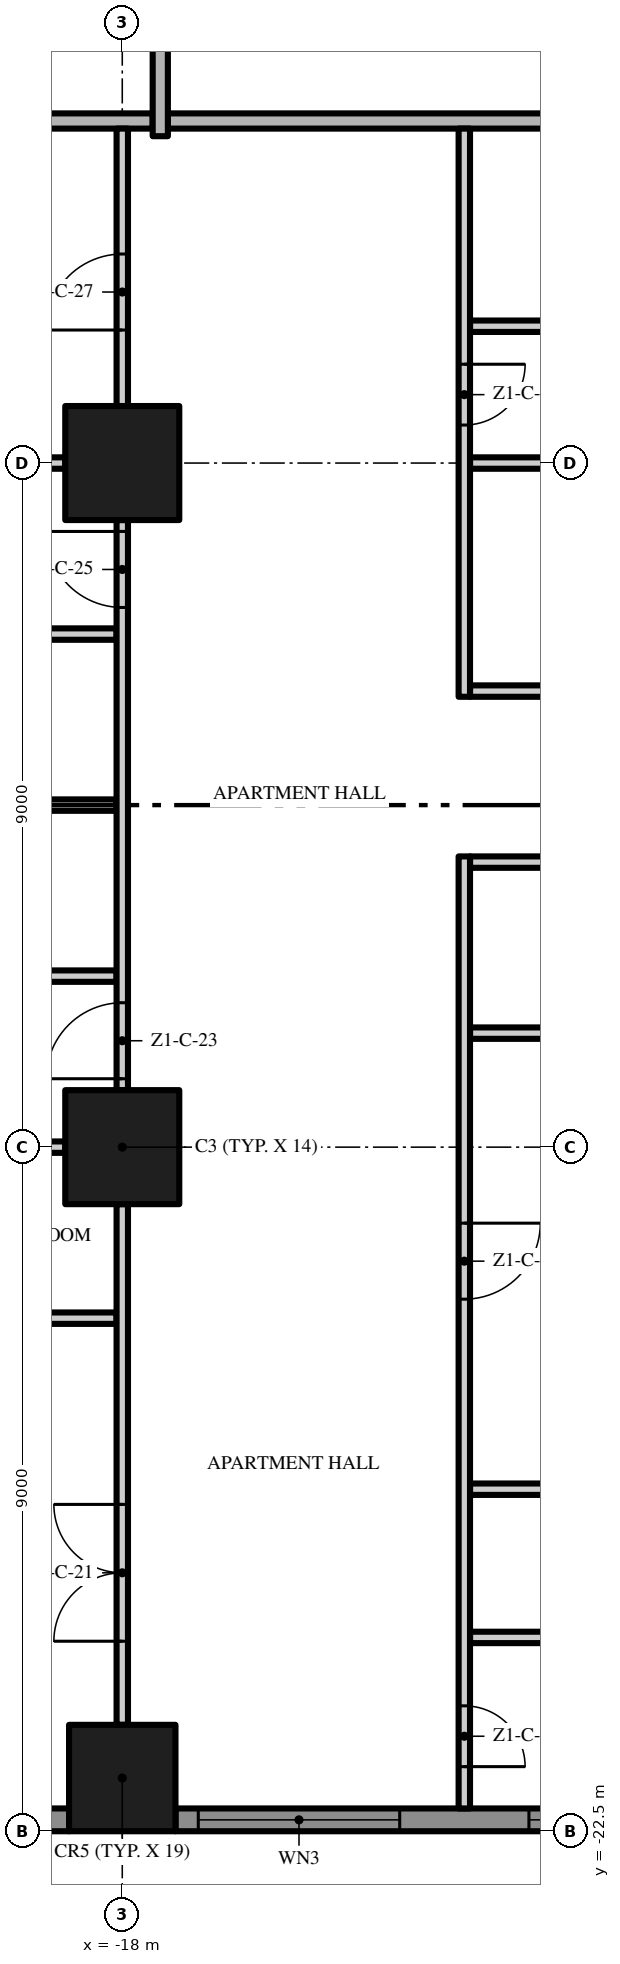
"""IFC4 building model, lengths in metres.
Left out: names, types, materials, properties, quantities, classifications, styles, units other than length and angle.
Written with IfcOpenShell. Run it as: python <this file> out.ifc"""

import sys

from ifc_helpers import new_model, si_unit, direction, frame, frame_2d, origin, origin_2d, place, context, subcontext, project, spatial, polyline, rectangle, outline, extrude, element, fill, save


model = new_model("IFC4")
c1 = context("Model", 3, precision=1e-05, world=origin(), true_north=direction((0.0, 1.0)))
c2 = subcontext(c1, "Body", "Model", "MODEL_VIEW")
j1 = project(units=[si_unit("LENGTHUNIT", "METRE"), si_unit("PLANEANGLEUNIT", "RADIAN")], contexts=[c1])
p1 = place(None, origin())
s1 = spatial("IfcSite", under=j1, at=p1, CompositionType="ELEMENT")
p2 = place(p1, origin())
s2 = spatial("IfcBuilding", under=s1, at=p2, CompositionType="ELEMENT")
p3 = place(p2, frame((0.0, 0.0, 45.4)))
s3 = spatial("IfcBuildingStorey", under=s2, at=p3, CompositionType="ELEMENT", Elevation=45.4)
p4 = place(p3, frame((-18.0, -13.5, 0.0), z_axis=(0.0, 0.0, 1.0), x_axis=(1.0, 0.0, 0.0)))
e1 = element("IfcColumn", 1, at=p4, inside=s3, PredefinedType="COLUMN", context=c2, shape_type="SweptSolid", body=[
    extrude(rectangle(XDim=1.5, YDim=1.5, at=origin_2d()), origin(), (0.0, 0.0, 1.0), 3.5),
])
p5 = place(p3, frame((-18.0, -21.8, 0.0), z_axis=(0.0, 0.0, 1.0), x_axis=(1.0, 0.0, 0.0)))
e2 = element("IfcColumn", 2, at=p5, inside=s3, PredefinedType="COLUMN", context=c2, shape_type="SweptSolid", body=[
    extrude(rectangle(XDim=1.4, YDim=1.4, at=origin_2d()), origin(), (0.0, 0.0, 1.0), 3.5),
])
p6 = place(p3, frame((-18.0, -4.5, 0.0), z_axis=(0.0, 0.0, 1.0), x_axis=(1.0, 0.0, 0.0)))
e3 = element("IfcColumn", 3, at=p6, inside=s3, PredefinedType="COLUMN", context=c2, shape_type="SweptSolid", body=[
    extrude(rectangle(XDim=1.5, YDim=1.5, at=origin_2d()), origin(), (0.0, 0.0, 1.0), 3.5),
])
p7 = place(p3, frame((-18.7, -22.35, 0.0), z_axis=(0.0, 0.0, 1.0), x_axis=(-1.0, 0.0, 0.0)))
e4 = element("IfcWall", 4, at=p7, inside=s3, PredefinedType="SOLIDWALL", context=c2, shape_type="SweptSolid", body=[
    extrude(rectangle(XDim=3.5, YDim=0.3, at=frame_2d((1.75, 0.0))), origin(), (0.0, 0.0, 1.0), 3.5),
])
p8 = place(p7, frame((0.3, 0.0, 0.0)))
e5 = element("IfcOpeningElement", 5, at=p8, cuts=e4, PredefinedType="OPENING", context=c2, shape_type="SweptSolid", body=[
    extrude(rectangle(XDim=2.65, YDim=2.4, at=frame_2d((1.325, 1.2))), frame((0.0, 0.16, 0.0), z_axis=(0.0, -1.0, 0.0), x_axis=(1.0, 0.0, 0.0)), (0.0, 0.0, 1.0), 0.32),
])
p9 = place(p3, frame((-9.7, -22.35, 0.0), z_axis=(0.0, 0.0, 1.0), x_axis=(-1.0, 0.0, 0.0)))
e6 = element("IfcWall", 6, at=p9, inside=s3, PredefinedType="SOLIDWALL", context=c2, shape_type="SweptSolid", body=[
    extrude(rectangle(XDim=7.6, YDim=0.3, at=frame_2d((3.8, 0.0))), origin(), (0.0, 0.0, 1.0), 3.5),
])
p10 = place(p9, frame((4.65, 0.0, 0.45)))
e7 = element("IfcOpeningElement", 7, at=p10, cuts=e6, PredefinedType="OPENING", context=c2, shape_type="SweptSolid", body=[
    extrude(rectangle(XDim=2.65, YDim=2.65, at=frame_2d((1.325, 1.325))), frame((0.0, 0.16, 0.0), z_axis=(0.0, -1.0, 0.0), x_axis=(1.0, 0.0, 0.0)), (0.0, 0.0, 1.0), 0.32),
])
p11 = place(p9, frame((0.3, 0.0, 0.45)))
e8 = element("IfcOpeningElement", 8, at=p11, cuts=e6, PredefinedType="OPENING", context=c2, shape_type="SweptSolid", body=[
    extrude(rectangle(XDim=2.65, YDim=2.65, at=frame_2d((1.325, 1.325))), frame((0.0, 0.16, 0.0), z_axis=(0.0, -1.0, 0.0), x_axis=(1.0, 0.0, 0.0)), (0.0, 0.0, 1.0), 0.32),
])
p12 = place(p3, origin())
e9 = element("IfcWall", 9, at=p12, inside=s3, PredefinedType="USERDEFINED", context=c2, shape_type="SweptSolid", body=[
    extrude(outline(polyline([(-22.5, -24.3), (-21.0, -25.005), (-19.5, -25.441), (-18.75, -25.5), (-18.0, -25.441), (-16.5, -25.005), (-15.0, -24.3), (-13.5, -23.595), (-12.0, -23.159), (-11.25, -23.1), (-10.5, -23.159), (-9.0, -23.595), (-7.5, -24.3), (-6.0, -25.005), (-4.5, -25.441), (-3.75, -25.5), (-3.0, -25.441), (-1.5, -25.005), (0.0, -24.3), (1.5, -23.595), (3.0, -23.159), (3.75, -23.1), (4.5, -23.159), (6.0, -23.595), (7.5, -24.3), (9.0, -25.005), (10.5, -25.441), (11.25, -25.5), (12.0, -25.441), (13.5, -25.005), (15.0, -24.3), (16.5, -23.595), (18.0, -23.159), (18.75, -23.1), (19.5, -23.159), (21.0, -23.595), (22.5, -24.3), (22.606, -24.074), (21.089, -23.36), (19.545, -22.911), (18.75, -22.849), (17.955, -22.911), (16.411, -23.36), (14.894, -24.074), (13.411, -24.771), (11.955, -25.194), (11.25, -25.249), (10.545, -25.194), (9.089, -24.771), (7.606, -24.074), (6.089, -23.36), (4.545, -22.911), (3.75, -22.849), (2.955, -22.911), (1.411, -23.36), (-0.106, -24.074), (-1.589, -24.771), (-3.045, -25.194), (-3.75, -25.249), (-4.455, -25.194), (-5.911, -24.771), (-7.394, -24.074), (-8.911, -23.36), (-10.455, -22.911), (-11.25, -22.849), (-12.045, -22.911), (-13.589, -23.36), (-15.106, -24.074), (-16.589, -24.771), (-18.045, -25.194), (-18.75, -25.249), (-19.455, -25.194), (-20.911, -24.771), (-22.394, -24.074), (-22.5, -24.3)])), origin(), (0.0, 0.0, 1.0), 0.9),
])
for number, where, z_axis, x_axis in (
    (10, (-13.425, -19.95, 0.0), (0.0, 0.0, 1.0), (1.0, 0.0, 0.0)),
    (11, (-13.425, -18.0, 0.0), (0.0, 0.0, 1.0), (1.0, 0.0, 0.0)),
):
    element("IfcWall", number, at=place(p3, frame(where, z_axis=z_axis, x_axis=x_axis)), inside=s3, PredefinedType="PARTITIONING", context=c2, shape_type="SweptSolid", body=[
        extrude(rectangle(XDim=4.35, YDim=0.15, at=frame_2d((2.175, 0.0))), origin(), (0.0, 0.0, 1.0), 3.5),
    ])
p13 = place(p3, frame((-20.925, -15.75, 0.0), z_axis=(0.0, 0.0, 1.0), x_axis=(1.0, 0.0, 0.0)))
e12 = element("IfcWall", 12, at=p13, inside=s3, PredefinedType="PARTITIONING", context=c2, shape_type="SweptSolid", body=[
    extrude(rectangle(XDim=2.85, YDim=0.15, at=frame_2d((1.425, 0.0))), origin(), (0.0, 0.0, 1.0), 3.5),
])
p14 = place(p3, frame((-25.6, -13.5, 0.0), z_axis=(0.0, 0.0, 1.0), x_axis=(1.0, 0.0, 0.0)))
e13 = element("IfcWall", 13, at=p14, inside=s3, PredefinedType="PARTITIONING", context=c2, shape_type="SweptSolid", body=[
    extrude(rectangle(XDim=6.85, YDim=0.15, at=frame_2d((3.425, 0.0))), origin(), (0.0, 0.0, 1.0), 3.5),
])
p15 = place(p3, frame((-13.425, -12.0, 0.0), z_axis=(0.0, 0.0, 1.0), x_axis=(1.0, 0.0, 0.0)))
e14 = element("IfcWall", 14, at=p15, inside=s3, PredefinedType="PARTITIONING", context=c2, shape_type="SweptSolid", body=[
    extrude(rectangle(XDim=4.35, YDim=0.15, at=frame_2d((2.175, 0.0))), origin(), (0.0, 0.0, 1.0), 3.5),
])
p16 = place(p3, frame((-20.925, -11.25, 0.0), z_axis=(0.0, 0.0, 1.0), x_axis=(1.0, 0.0, 0.0)))
e15 = element("IfcWall", 15, at=p16, inside=s3, PredefinedType="PARTITIONING", context=c2, shape_type="SweptSolid", body=[
    extrude(rectangle(XDim=2.85, YDim=0.15, at=frame_2d((1.425, 0.0))), origin(), (0.0, 0.0, 1.0), 3.5),
])
p17 = place(p3, frame((-9.075, -9.75, 0.0), z_axis=(0.0, 0.0, 1.0), x_axis=(-1.0, 0.0, 0.0)))
e16 = element("IfcWall", 16, at=p17, inside=s3, PredefinedType="PARTITIONING", context=c2, shape_type="SweptSolid", body=[
    extrude(rectangle(XDim=4.35, YDim=0.15, at=frame_2d((2.175, 0.0))), origin(), (0.0, 0.0, 1.0), 3.5),
])
p18 = place(p17, frame((1.7, 0.0, 0.0)))
e17 = element("IfcOpeningElement", 17, at=p18, cuts=e16, PredefinedType="OPENING", context=c2, shape_type="SweptSolid", body=[
    extrude(rectangle(XDim=0.9, YDim=2.1, at=frame_2d((0.45, 1.05))), frame((0.0, 0.085, 0.0), z_axis=(0.0, -1.0, 0.0), x_axis=(1.0, 0.0, 0.0)), (0.0, 0.0, 1.0), 0.17),
])
p19 = place(p3, frame((-20.925, -9.0, 0.0), z_axis=(0.0, 0.0, 1.0), x_axis=(1.0, 0.0, 0.0)))
e18 = element("IfcWall", 18, at=p19, inside=s3, PredefinedType="PARTITIONING", context=c2, shape_type="SweptSolid", body=[
    extrude(rectangle(XDim=2.85, YDim=0.15, at=frame_2d((1.425, 0.0))), origin(), (0.0, 0.0, 1.0), 3.5),
])
p20 = place(p3, frame((-13.425, -7.5, 0.0), z_axis=(0.0, 0.0, 1.0), x_axis=(1.0, 0.0, 0.0)))
e19 = element("IfcWall", 19, at=p20, inside=s3, PredefinedType="PARTITIONING", context=c2, shape_type="SweptSolid", body=[
    extrude(rectangle(XDim=4.35, YDim=0.15, at=frame_2d((2.175, 0.0))), origin(), (0.0, 0.0, 1.0), 3.5),
])
p21 = place(p3, frame((-20.925, -6.75, 0.0), z_axis=(0.0, 0.0, 1.0), x_axis=(1.0, 0.0, 0.0)))
e20 = element("IfcWall", 20, at=p21, inside=s3, PredefinedType="PARTITIONING", context=c2, shape_type="SweptSolid", body=[
    extrude(rectangle(XDim=2.85, YDim=0.15, at=frame_2d((1.425, 0.0))), origin(), (0.0, 0.0, 1.0), 3.5),
])
p22 = place(p3, frame((-25.6, -4.5, 0.0), z_axis=(0.0, 0.0, 1.0), x_axis=(1.0, 0.0, 0.0)))
e21 = element("IfcWall", 21, at=p22, inside=s3, PredefinedType="PARTITIONING", context=c2, shape_type="SweptSolid", body=[
    extrude(rectangle(XDim=6.85, YDim=0.15, at=frame_2d((3.425, 0.0))), origin(), (0.0, 0.0, 1.0), 3.5),
])
p23 = place(p3, frame((-13.425, -4.5, 0.0), z_axis=(0.0, 0.0, 1.0), x_axis=(1.0, 0.0, 0.0)))
e22 = element("IfcWall", 22, at=p23, inside=s3, PredefinedType="PARTITIONING", context=c2, shape_type="SweptSolid", body=[
    extrude(rectangle(XDim=3.675, YDim=0.15, at=frame_2d((1.837, 0.0))), origin(), (0.0, 0.0, 1.0), 3.5),
])
p24 = place(p3, frame((-13.425, -2.7, 0.0), z_axis=(0.0, 0.0, 1.0), x_axis=(1.0, 0.0, 0.0)))
e23 = element("IfcWall", 23, at=p24, inside=s3, PredefinedType="PARTITIONING", context=c2, shape_type="SweptSolid", body=[
    extrude(rectangle(XDim=4.35, YDim=0.15, at=frame_2d((2.175, 0.0))), origin(), (0.0, 0.0, 1.0), 3.5),
])
p25 = place(p3, frame((-17.4, 0.0, 0.0), z_axis=(0.0, 0.0, 1.0), x_axis=(1.0, 0.0, 0.0)))
e24 = element("IfcWall", 24, at=p25, inside=s3, PredefinedType="PARTITIONING", context=c2, shape_type="SweptSolid", body=[
    extrude(rectangle(XDim=12.8, YDim=0.2, at=frame_2d((6.4, 0.0))), origin(), (0.0, 0.0, 1.0), 3.5),
])
p26 = place(p3, frame((-26.7, 0.0, 0.0), z_axis=(0.0, 0.0, 1.0), x_axis=(1.0, 0.0, 0.0)))
e25 = element("IfcWall", 25, at=p26, inside=s3, PredefinedType="PARTITIONING", context=c2, shape_type="SweptSolid", body=[
    extrude(rectangle(XDim=9.1, YDim=0.2, at=frame_2d((4.55, 0.0))), origin(), (0.0, 0.0, 1.0), 3.5),
])
p27 = place(p3, frame((-18.0, -21.1, 0.0), z_axis=(0.0, 0.0, 1.0), x_axis=(0.0, 1.0, 0.0)))
e26 = element("IfcWall", 26, at=p27, inside=s3, PredefinedType="PARTITIONING", context=c2, shape_type="SweptSolid", body=[
    extrude(rectangle(XDim=6.85, YDim=0.15, at=frame_2d((3.425, 0.0))), origin(), (0.0, 0.0, 1.0), 3.5),
])
p28 = place(p27, frame((1.1, 0.0, 0.0)))
e27 = element("IfcOpeningElement", 27, at=p28, cuts=e26, PredefinedType="OPENING", context=c2, shape_type="SweptSolid", body=[
    extrude(rectangle(XDim=1.8, YDim=2.4, at=frame_2d((0.9, 1.2))), frame((0.0, 0.085, 0.0), z_axis=(0.0, -1.0, 0.0), x_axis=(1.0, 0.0, 0.0)), (0.0, 0.0, 1.0), 0.17),
])
p29 = place(p3, frame((-18.0, -12.75, 0.0), z_axis=(0.0, 0.0, 1.0), x_axis=(0.0, 1.0, 0.0)))
e28 = element("IfcWall", 28, at=p29, inside=s3, PredefinedType="PARTITIONING", context=c2, shape_type="SweptSolid", body=[
    extrude(rectangle(XDim=7.5, YDim=0.15, at=frame_2d((3.75, 0.0))), origin(), (0.0, 0.0, 1.0), 3.5),
])
p30 = place(p29, frame((0.15, 0.0, 0.0)))
e29 = element("IfcOpeningElement", 29, at=p30, cuts=e28, PredefinedType="OPENING", context=c2, shape_type="SweptSolid", body=[
    extrude(rectangle(XDim=1.0, YDim=2.4, at=frame_2d((0.5, 1.2))), frame((0.0, 0.085, 0.0), z_axis=(0.0, -1.0, 0.0), x_axis=(1.0, 0.0, 0.0)), (0.0, 0.0, 1.0), 0.17),
])
p31 = place(p29, frame((6.35, 0.0, 0.0)))
e30 = element("IfcOpeningElement", 30, at=p31, cuts=e28, PredefinedType="OPENING", context=c2, shape_type="SweptSolid", body=[
    extrude(rectangle(XDim=1.0, YDim=2.4, at=frame_2d((0.5, 1.2))), frame((0.0, 0.085, 0.0), z_axis=(0.0, -1.0, 0.0), x_axis=(1.0, 0.0, 0.0)), (0.0, 0.0, 1.0), 0.17),
])
p32 = place(p3, frame((-18.0, -3.75, 0.0), z_axis=(0.0, 0.0, 1.0), x_axis=(0.0, 1.0, 0.0)))
e31 = element("IfcWall", 31, at=p32, inside=s3, PredefinedType="PARTITIONING", context=c2, shape_type="SweptSolid", body=[
    extrude(rectangle(XDim=3.65, YDim=0.15, at=frame_2d((1.825, 0.0))), origin(), (0.0, 0.0, 1.0), 3.5),
])
p33 = place(p32, frame((1.0, 0.0, 0.0)))
e32 = element("IfcOpeningElement", 32, at=p33, cuts=e31, PredefinedType="OPENING", context=c2, shape_type="SweptSolid", body=[
    extrude(rectangle(XDim=1.0, YDim=2.4, at=frame_2d((0.5, 1.2))), frame((0.0, 0.085, 0.0), z_axis=(0.0, -1.0, 0.0), x_axis=(1.0, 0.0, 0.0)), (0.0, 0.0, 1.0), 0.17),
])
p34 = place(p3, frame((-17.5, -0.2, 0.0), z_axis=(0.0, 0.0, 1.0), x_axis=(0.0, 1.0, 0.0)))
e33 = element("IfcWall", 33, at=p34, inside=s3, PredefinedType="PARTITIONING", context=c2, shape_type="SweptSolid", body=[
    extrude(rectangle(XDim=3.95, YDim=0.2, at=frame_2d((1.975, 0.0))), origin(), (0.0, 0.0, 1.0), 3.5),
])
p35 = place(p3, frame((-13.5, -9.675, 0.0), z_axis=(0.0, 0.0, 1.0), x_axis=(0.0, -1.0, 0.0)))
e34 = element("IfcWall", 34, at=p35, inside=s3, PredefinedType="PARTITIONING", context=c2, shape_type="SweptSolid", body=[
    extrude(rectangle(XDim=12.525, YDim=0.15, at=frame_2d((6.263, 0.0))), origin(), (0.0, 0.0, 1.0), 3.5),
])
p36 = place(p35, frame((11.175, 0.0, 0.0)))
e35 = element("IfcOpeningElement", 35, at=p36, cuts=e34, PredefinedType="OPENING", context=c2, shape_type="SweptSolid", body=[
    extrude(rectangle(XDim=0.8, YDim=2.0, at=frame_2d((0.4, 1.0))), frame((0.0, 0.085, 0.0), z_axis=(0.0, -1.0, 0.0), x_axis=(1.0, 0.0, 0.0)), (0.0, 0.0, 1.0), 0.17),
])
p37 = place(p35, frame((4.825, 0.0, 0.0)))
e36 = element("IfcOpeningElement", 36, at=p37, cuts=e34, PredefinedType="OPENING", context=c2, shape_type="SweptSolid", body=[
    extrude(rectangle(XDim=1.0, YDim=2.4, at=frame_2d((0.5, 1.2))), frame((0.0, 0.085, 0.0), z_axis=(0.0, -1.0, 0.0), x_axis=(1.0, 0.0, 0.0)), (0.0, 0.0, 1.0), 0.17),
])
p38 = place(p3, frame((-13.5, -0.1, 0.0), z_axis=(0.0, 0.0, 1.0), x_axis=(0.0, -1.0, 0.0)))
e37 = element("IfcWall", 37, at=p38, inside=s3, PredefinedType="PARTITIONING", context=c2, shape_type="SweptSolid", body=[
    extrude(rectangle(XDim=7.475, YDim=0.15, at=frame_2d((3.737, 0.0))), origin(), (0.0, 0.0, 1.0), 3.5),
])
p39 = place(p38, frame((3.1, 0.0, 0.0)))
e38 = element("IfcOpeningElement", 38, at=p39, cuts=e37, PredefinedType="OPENING", context=c2, shape_type="SweptSolid", body=[
    extrude(rectangle(XDim=0.8, YDim=2.0, at=frame_2d((0.4, 1.0))), frame((0.0, 0.085, 0.0), z_axis=(0.0, -1.0, 0.0), x_axis=(1.0, 0.0, 0.0)), (0.0, 0.0, 1.0), 0.17),
])
p40 = place(p10, origin())
e39 = element("IfcWindow", 39, at=p40, inside=s3, PartitioningType="SINGLE_PANEL", PredefinedType="WINDOW", context=c2, shape_type="SweptSolid", body=[
    extrude(rectangle(XDim=2.65, YDim=2.65, at=frame_2d((1.325, 1.325))), frame((0.0, 0.03, 0.0), z_axis=(0.0, -1.0, 0.0), x_axis=(1.0, 0.0, 0.0)), (0.0, 0.0, 1.0), 0.06),
])
fill(e7, e39)
p41 = place(p11, origin())
e40 = element("IfcWindow", 40, at=p41, inside=s3, PartitioningType="SINGLE_PANEL", PredefinedType="WINDOW", context=c2, shape_type="SweptSolid", body=[
    extrude(rectangle(XDim=2.65, YDim=2.65, at=frame_2d((1.325, 1.325))), frame((0.0, 0.03, 0.0), z_axis=(0.0, -1.0, 0.0), x_axis=(1.0, 0.0, 0.0)), (0.0, 0.0, 1.0), 0.06),
])
fill(e8, e40)
p42 = place(p36, origin())
e41 = element("IfcDoor", 41, at=p42, inside=s3, OperationType="SINGLE_SWING_RIGHT", PredefinedType="DOOR", context=c2, shape_type="SweptSolid", body=[
    extrude(rectangle(XDim=0.8, YDim=2.0, at=frame_2d((0.4, 1.0))), frame((0.0, 0.025, 0.0), z_axis=(0.0, -1.0, 0.0), x_axis=(1.0, 0.0, 0.0)), (0.0, 0.0, 1.0), 0.05),
])
fill(e35, e41)
p43 = place(p37, origin())
e42 = element("IfcDoor", 42, at=p43, inside=s3, OperationType="SINGLE_SWING_LEFT", PredefinedType="DOOR", context=c2, shape_type="SweptSolid", body=[
    extrude(rectangle(XDim=1.0, YDim=2.4, at=frame_2d((0.5, 1.2))), frame((0.0, 0.025, 0.0), z_axis=(0.0, -1.0, 0.0), x_axis=(1.0, 0.0, 0.0)), (0.0, 0.0, 1.0), 0.05),
])
fill(e36, e42)
p44 = place(p39, origin())
e43 = element("IfcDoor", 43, at=p44, inside=s3, OperationType="SINGLE_SWING_LEFT", PredefinedType="DOOR", context=c2, shape_type="SweptSolid", body=[
    extrude(rectangle(XDim=0.8, YDim=2.0, at=frame_2d((0.4, 1.0))), frame((0.0, 0.025, 0.0), z_axis=(0.0, -1.0, 0.0), x_axis=(1.0, 0.0, 0.0)), (0.0, 0.0, 1.0), 0.05),
])
fill(e38, e43)
p45 = place(p28, origin())
e44 = element("IfcDoor", 44, at=p45, inside=s3, OperationType="DOUBLE_DOOR_SINGLE_SWING", PredefinedType="DOOR", context=c2, shape_type="SweptSolid", body=[
    extrude(rectangle(XDim=1.8, YDim=2.4, at=frame_2d((0.9, 1.2))), frame((0.0, 0.025, 0.0), z_axis=(0.0, -1.0, 0.0), x_axis=(1.0, 0.0, 0.0)), (0.0, 0.0, 1.0), 0.05),
])
fill(e27, e44)
p46 = place(p30, origin())
e45 = element("IfcDoor", 45, at=p46, inside=s3, OperationType="SINGLE_SWING_LEFT", PredefinedType="DOOR", context=c2, shape_type="SweptSolid", body=[
    extrude(rectangle(XDim=1.0, YDim=2.4, at=frame_2d((0.5, 1.2))), frame((0.0, 0.025, 0.0), z_axis=(0.0, -1.0, 0.0), x_axis=(1.0, 0.0, 0.0)), (0.0, 0.0, 1.0), 0.05),
])
fill(e29, e45)
p47 = place(p31, origin())
e46 = element("IfcDoor", 46, at=p47, inside=s3, OperationType="SINGLE_SWING_RIGHT", PredefinedType="DOOR", context=c2, shape_type="SweptSolid", body=[
    extrude(rectangle(XDim=1.0, YDim=2.4, at=frame_2d((0.5, 1.2))), frame((0.0, 0.025, 0.0), z_axis=(0.0, -1.0, 0.0), x_axis=(1.0, 0.0, 0.0)), (0.0, 0.0, 1.0), 0.05),
])
fill(e30, e46)
p48 = place(p33, origin())
e47 = element("IfcDoor", 47, at=p48, inside=s3, OperationType="SINGLE_SWING_LEFT", PredefinedType="DOOR", context=c2, shape_type="SweptSolid", body=[
    extrude(rectangle(XDim=1.0, YDim=2.4, at=frame_2d((0.5, 1.2))), frame((0.0, 0.025, 0.0), z_axis=(0.0, -1.0, 0.0), x_axis=(1.0, 0.0, 0.0)), (0.0, 0.0, 1.0), 0.05),
])
fill(e32, e47)
save(model, sys.argv[1])
